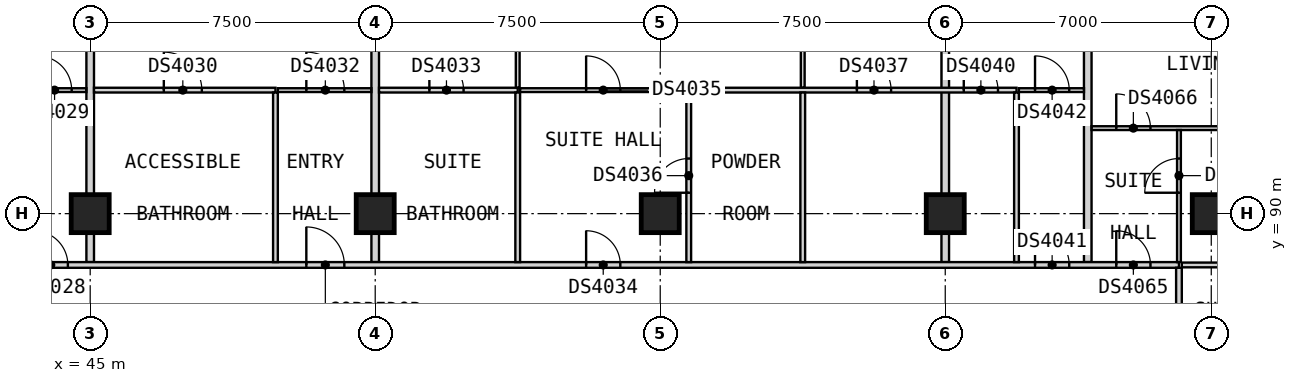
"""IFC4 building model, lengths in metres.
Left out: names, types, materials, properties, quantities, classifications, styles, units other than length and angle.
Written with IfcOpenShell. Run it as: python <this file> out.ifc"""

import sys

from ifc_helpers import new_model, si_unit, direction, frame, frame_2d, origin, origin_2d, place, context, subcontext, project, spatial, rectangle, extrude, element, fill, save


model = new_model("IFC4")
c1 = context("Model", 3, precision=1e-05, world=origin(), true_north=direction((0.0, 1.0)))
c2 = subcontext(c1, "Body", "Model", "MODEL_VIEW")
j1 = project(units=[si_unit("LENGTHUNIT", "METRE"), si_unit("PLANEANGLEUNIT", "RADIAN")], contexts=[c1])
p1 = place(None, origin())
s1 = spatial("IfcSite", under=j1, at=p1, CompositionType="ELEMENT")
p2 = place(p1, origin())
s2 = spatial("IfcBuilding", under=s1, at=p2, CompositionType="ELEMENT")
p3 = place(p2, frame((0.0, 0.0, 141.0)))
s3 = spatial("IfcBuildingStorey", under=s2, at=p3, CompositionType="ELEMENT", Elevation=141.0)
for number, where, z_axis, x_axis in (
    (1, (45.0, 90.0, 0.0), (0.0, 0.0, 1.0), (1.0, 0.0, 0.0)),
    (2, (52.5, 90.0, 0.0), (0.0, 0.0, 1.0), (1.0, 0.0, 0.0)),
    (3, (60.0, 90.0, 0.0), (0.0, 0.0, 1.0), (1.0, 0.0, 0.0)),
    (4, (67.5, 90.0, 0.0), (0.0, 0.0, 1.0), (1.0, 0.0, 0.0)),
    (5, (74.5, 90.0, 0.0), (0.0, 0.0, 1.0), (1.0, 0.0, 0.0)),
):
    element("IfcColumn", number, at=place(p3, frame(where, z_axis=z_axis, x_axis=x_axis)), inside=s3, PredefinedType="COLUMN", context=c2, shape_type="SweptSolid", body=[
        extrude(rectangle(XDim=1.0, YDim=1.0, at=origin_2d()), origin(), (0.0, 0.0, 1.0), 3.6),
    ])
for number, where, z_axis, x_axis in (
    (6, (45.0, 88.725, 0.0), (0.0, 0.0, 1.0), (0.0, 1.0, 0.0)),
    (7, (52.5, 88.725, 0.0), (0.0, 0.0, 1.0), (0.0, 1.0, 0.0)),
    (8, (67.5, 88.725, 0.0), (0.0, 0.0, 1.0), (0.0, 1.0, 0.0)),
):
    element("IfcWall", number, at=place(p3, frame(where, z_axis=z_axis, x_axis=x_axis)), inside=s3, PredefinedType="PARTITIONING", context=c2, shape_type="SweptSolid", body=[
        extrude(rectangle(XDim=12.525, YDim=0.2, at=frame_2d((6.262, 0.0))), origin(), (0.0, 0.0, 1.0), 3.35),
    ])
p4 = place(p3, frame((71.25, 88.725, 0.0), z_axis=(0.0, 0.0, 1.0), x_axis=(0.0, 1.0, 0.0)))
e9 = element("IfcWall", 9, at=p4, inside=s3, PredefinedType="PARTITIONING", context=c2, shape_type="SweptSolid", body=[
    extrude(rectangle(XDim=11.715, YDim=0.2, at=frame_2d((5.857, 0.0))), origin(), (0.0, 0.0, 1.0), 3.35),
])
p5 = place(p3, frame((33.75, 88.65, 0.0), z_axis=(0.0, 0.0, 1.0), x_axis=(1.0, 0.0, 0.0)))
e10 = element("IfcWall", 10, at=p5, inside=s3, PredefinedType="PARTITIONING", context=c2, shape_type="SweptSolid", body=[
    extrude(rectangle(XDim=39.9, YDim=0.15, at=frame_2d((19.95, 0.0))), origin(), (0.0, 0.0, 1.0), 3.35),
])
p6 = place(p5, frame((5.175, 0.0, 0.0)))
e11 = element("IfcOpeningElement", 11, at=p6, cuts=e10, PredefinedType="OPENING", context=c2, shape_type="SweptSolid", body=[
    extrude(rectangle(XDim=0.9, YDim=2.1, at=frame_2d((0.45, 1.05))), frame((0.0, 0.085, 0.0), z_axis=(0.0, -1.0, 0.0), x_axis=(1.0, 0.0, 0.0)), (0.0, 0.0, 1.0), 0.17),
])
p7 = place(p5, frame((9.762, 0.0, 0.0)))
e12 = element("IfcOpeningElement", 12, at=p7, cuts=e10, PredefinedType="OPENING", context=c2, shape_type="SweptSolid", body=[
    extrude(rectangle(XDim=0.9, YDim=2.1, at=frame_2d((0.45, 1.05))), frame((0.0, 0.085, 0.0), z_axis=(0.0, -1.0, 0.0), x_axis=(1.0, 0.0, 0.0)), (0.0, 0.0, 1.0), 0.17),
])
p8 = place(p5, frame((16.938, 0.0, 0.0)))
e13 = element("IfcOpeningElement", 13, at=p8, cuts=e10, PredefinedType="OPENING", context=c2, shape_type="SweptSolid", body=[
    extrude(rectangle(XDim=1.0, YDim=2.1, at=frame_2d((0.5, 1.05))), frame((0.0, 0.085, 0.0), z_axis=(0.0, -1.0, 0.0), x_axis=(1.0, 0.0, 0.0)), (0.0, 0.0, 1.0), 0.17),
])
p9 = place(p5, frame((24.3, 0.0, 0.0)))
e14 = element("IfcOpeningElement", 14, at=p9, cuts=e10, PredefinedType="OPENING", context=c2, shape_type="SweptSolid", body=[
    extrude(rectangle(XDim=0.9, YDim=2.1, at=frame_2d((0.45, 1.05))), frame((0.0, 0.085, 0.0), z_axis=(0.0, -1.0, 0.0), x_axis=(1.0, 0.0, 0.0)), (0.0, 0.0, 1.0), 0.17),
])
p10 = place(p5, frame((36.113, 0.0, 0.0)))
e15 = element("IfcOpeningElement", 15, at=p10, cuts=e10, PredefinedType="OPENING", context=c2, shape_type="SweptSolid", body=[
    extrude(rectangle(XDim=0.9, YDim=2.1, at=frame_2d((0.45, 1.05))), frame((0.0, 0.085, 0.0), z_axis=(0.0, -1.0, 0.0), x_axis=(1.0, 0.0, 0.0)), (0.0, 0.0, 1.0), 0.17),
])
p11 = place(p5, frame((38.25, 0.0, 0.0)))
e16 = element("IfcOpeningElement", 16, at=p11, cuts=e10, PredefinedType="OPENING", context=c2, shape_type="SweptSolid", body=[
    extrude(rectangle(XDim=0.9, YDim=2.1, at=frame_2d((0.45, 1.05))), frame((0.0, 0.085, 0.0), z_axis=(0.0, -1.0, 0.0), x_axis=(1.0, 0.0, 0.0)), (0.0, 0.0, 1.0), 0.17),
])
p12 = place(p3, frame((73.65, 50.175, 0.0), z_axis=(0.0, 0.0, 1.0), x_axis=(0.0, 1.0, 0.0)))
e17 = element("IfcWall", 17, at=p12, inside=s3, PredefinedType="PARTITIONING", context=c2, shape_type="SweptSolid", body=[
    extrude(rectangle(XDim=38.4, YDim=0.15, at=frame_2d((19.2, 0.0))), origin(), (0.0, 0.0, 1.0), 3.35),
])
p13 = place(p12, frame((7.875, 0.0, 0.0)))
e18 = element("IfcOpeningElement", 18, at=p13, cuts=e17, PredefinedType="OPENING", context=c2, shape_type="SweptSolid", body=[
    extrude(rectangle(XDim=0.9, YDim=2.1, at=frame_2d((0.45, 1.05))), frame((0.0, 0.085, 0.0), z_axis=(0.0, -1.0, 0.0), x_axis=(1.0, 0.0, 0.0)), (0.0, 0.0, 1.0), 0.17),
])
p14 = place(p12, frame((23.012, 0.0, 0.0)))
e19 = element("IfcOpeningElement", 19, at=p14, cuts=e17, PredefinedType="OPENING", context=c2, shape_type="SweptSolid", body=[
    extrude(rectangle(XDim=1.0, YDim=2.1, at=frame_2d((0.5, 1.05))), frame((0.0, 0.085, 0.0), z_axis=(0.0, -1.0, 0.0), x_axis=(1.0, 0.0, 0.0)), (0.0, 0.0, 1.0), 0.17),
])
p15 = place(p12, frame((27.188, 0.0, 0.0)))
e20 = element("IfcOpeningElement", 20, at=p15, cuts=e17, PredefinedType="OPENING", context=c2, shape_type="SweptSolid", body=[
    extrude(rectangle(XDim=0.9, YDim=2.1, at=frame_2d((0.45, 1.05))), frame((0.0, 0.085, 0.0), z_axis=(0.0, -1.0, 0.0), x_axis=(1.0, 0.0, 0.0)), (0.0, 0.0, 1.0), 0.17),
])
p16 = place(p12, frame((34.125, 0.0, 0.0)))
e21 = element("IfcOpeningElement", 21, at=p16, cuts=e17, PredefinedType="OPENING", context=c2, shape_type="SweptSolid", body=[
    extrude(rectangle(XDim=0.9, YDim=2.1, at=frame_2d((0.45, 1.05))), frame((0.0, 0.085, 0.0), z_axis=(0.0, -1.0, 0.0), x_axis=(1.0, 0.0, 0.0)), (0.0, 0.0, 1.0), 0.17),
])
p17 = place(p3, frame((71.35, 92.25, 0.0), z_axis=(0.0, 0.0, 1.0), x_axis=(1.0, 0.0, 0.0)))
e22 = element("IfcWall", 22, at=p17, inside=s3, PredefinedType="PARTITIONING", context=c2, shape_type="SweptSolid", body=[
    extrude(rectangle(XDim=7.35, YDim=0.1, at=frame_2d((3.675, 0.0))), origin(), (0.0, 0.0, 1.0), 3.35),
])
p18 = place(p17, frame((0.65, 0.0, 0.0)))
e23 = element("IfcOpeningElement", 23, at=p18, cuts=e22, PredefinedType="OPENING", context=c2, shape_type="SweptSolid", body=[
    extrude(rectangle(XDim=0.9, YDim=2.1, at=frame_2d((0.45, 1.05))), frame((0.0, 0.06, 0.0), z_axis=(0.0, -1.0, 0.0), x_axis=(1.0, 0.0, 0.0)), (0.0, 0.0, 1.0), 0.12),
])
p19 = place(p3, frame((43.188, 93.25, 0.0), z_axis=(0.0, 0.0, 1.0), x_axis=(1.0, 0.0, 0.0)))
e24 = element("IfcWall", 24, at=p19, inside=s3, PredefinedType="PARTITIONING", context=c2, shape_type="SweptSolid", body=[
    extrude(rectangle(XDim=1.712, YDim=0.1, at=frame_2d((0.856, 0.0))), origin(), (0.0, 0.0, 1.0), 3.35),
])
p20 = place(p19, frame((0.425, 0.0, 0.0)))
e25 = element("IfcOpeningElement", 25, at=p20, cuts=e24, PredefinedType="OPENING", context=c2, shape_type="SweptSolid", body=[
    extrude(rectangle(XDim=0.9, YDim=2.1, at=frame_2d((0.45, 1.05))), frame((0.0, 0.06, 0.0), z_axis=(0.0, -1.0, 0.0), x_axis=(1.0, 0.0, 0.0)), (0.0, 0.0, 1.0), 0.12),
])
p21 = place(p3, frame((49.938, 93.25, 0.0), z_axis=(0.0, 0.0, 1.0), x_axis=(1.0, 0.0, 0.0)))
e26 = element("IfcWall", 26, at=p21, inside=s3, PredefinedType="PARTITIONING", context=c2, shape_type="SweptSolid", body=[
    extrude(rectangle(XDim=2.462, YDim=0.1, at=frame_2d((1.231, 0.0))), origin(), (0.0, 0.0, 1.0), 3.35),
])
p22 = place(p21, frame((0.75, 0.0, 0.0)))
e27 = element("IfcOpeningElement", 27, at=p22, cuts=e26, PredefinedType="OPENING", context=c2, shape_type="SweptSolid", body=[
    extrude(rectangle(XDim=1.0, YDim=2.1, at=frame_2d((0.5, 1.05))), frame((0.0, 0.06, 0.0), z_axis=(0.0, -1.0, 0.0), x_axis=(1.0, 0.0, 0.0)), (0.0, 0.0, 1.0), 0.12),
])
p23 = place(p3, frame((56.312, 93.25, 0.0), z_axis=(0.0, 0.0, 1.0), x_axis=(1.0, 0.0, 0.0)))
e28 = element("IfcWall", 28, at=p23, inside=s3, PredefinedType="PARTITIONING", context=c2, shape_type="SweptSolid", body=[
    extrude(rectangle(XDim=4.375, YDim=0.1, at=frame_2d((2.188, 0.0))), origin(), (0.0, 0.0, 1.0), 3.35),
])
p24 = place(p23, frame((1.738, 0.0, 0.0)))
e29 = element("IfcOpeningElement", 29, at=p24, cuts=e28, PredefinedType="OPENING", context=c2, shape_type="SweptSolid", body=[
    extrude(rectangle(XDim=0.9, YDim=2.1, at=frame_2d((0.45, 1.05))), frame((0.0, 0.06, 0.0), z_axis=(0.0, -1.0, 0.0), x_axis=(1.0, 0.0, 0.0)), (0.0, 0.0, 1.0), 0.12),
])
p25 = place(p3, frame((69.438, 93.25, 0.0), z_axis=(0.0, 0.0, 1.0), x_axis=(1.0, 0.0, 0.0)))
e30 = element("IfcWall", 30, at=p25, inside=s3, PredefinedType="PARTITIONING", context=c2, shape_type="SweptSolid", body=[
    extrude(rectangle(XDim=1.712, YDim=0.1, at=frame_2d((0.856, 0.0))), origin(), (0.0, 0.0, 1.0), 3.35),
])
p26 = place(p25, frame((0.425, 0.0, 0.0)))
e31 = element("IfcOpeningElement", 31, at=p26, cuts=e30, PredefinedType="OPENING", context=c2, shape_type="SweptSolid", body=[
    extrude(rectangle(XDim=0.9, YDim=2.1, at=frame_2d((0.45, 1.05))), frame((0.0, 0.06, 0.0), z_axis=(0.0, -1.0, 0.0), x_axis=(1.0, 0.0, 0.0)), (0.0, 0.0, 1.0), 0.12),
])
p27 = place(p3, frame((56.25, 93.312, 0.0), z_axis=(0.0, 0.0, 1.0), x_axis=(0.0, 1.0, 0.0)))
e32 = element("IfcWall", 32, at=p27, inside=s3, PredefinedType="PARTITIONING", context=c2, shape_type="SweptSolid", body=[
    extrude(rectangle(XDim=7.127, YDim=0.1, at=frame_2d((3.564, 0.0))), origin(), (0.0, 0.0, 1.0), 3.35),
])
p28 = place(p27, frame((3.488, 0.0, 0.0)))
e33 = element("IfcOpeningElement", 33, at=p28, cuts=e32, PredefinedType="OPENING", context=c2, shape_type="SweptSolid", body=[
    extrude(rectangle(XDim=0.9, YDim=2.1, at=frame_2d((0.45, 1.05))), frame((0.0, 0.06, 0.0), z_axis=(0.0, -1.0, 0.0), x_axis=(1.0, 0.0, 0.0)), (0.0, 0.0, 1.0), 0.12),
])
p29 = place(p3, frame((63.75, 93.312, 0.0), z_axis=(0.0, 0.0, 1.0), x_axis=(0.0, 1.0, 0.0)))
e34 = element("IfcWall", 34, at=p29, inside=s3, PredefinedType="PARTITIONING", context=c2, shape_type="SweptSolid", body=[
    extrude(rectangle(XDim=7.127, YDim=0.1, at=frame_2d((3.564, 0.0))), origin(), (0.0, 0.0, 1.0), 3.35),
])
p30 = place(p29, frame((3.488, 0.0, 0.0)))
e35 = element("IfcOpeningElement", 35, at=p30, cuts=e34, PredefinedType="OPENING", context=c2, shape_type="SweptSolid", body=[
    extrude(rectangle(XDim=0.9, YDim=2.1, at=frame_2d((0.45, 1.05))), frame((0.0, 0.06, 0.0), z_axis=(0.0, -1.0, 0.0), x_axis=(1.0, 0.0, 0.0)), (0.0, 0.0, 1.0), 0.12),
])
p31 = place(p3, frame((73.65, 88.725, 0.0), z_axis=(0.0, 0.0, 1.0), x_axis=(0.0, 1.0, 0.0)))
e36 = element("IfcWall", 36, at=p31, inside=s3, PredefinedType="PARTITIONING", context=c2, shape_type="SweptSolid", body=[
    extrude(rectangle(XDim=3.475, YDim=0.1, at=frame_2d((1.737, 0.0))), origin(), (0.0, 0.0, 1.0), 3.35),
])
p32 = place(p31, frame((1.825, 0.0, 0.0)))
e37 = element("IfcOpeningElement", 37, at=p32, cuts=e36, PredefinedType="OPENING", context=c2, shape_type="SweptSolid", body=[
    extrude(rectangle(XDim=0.9, YDim=2.1, at=frame_2d((0.45, 1.05))), frame((0.0, 0.06, 0.0), z_axis=(0.0, -1.0, 0.0), x_axis=(1.0, 0.0, 0.0)), (0.0, 0.0, 1.0), 0.12),
])
p33 = place(p3, frame((73.725, 88.65, 0.0), z_axis=(0.0, 0.0, 1.0), x_axis=(1.0, 0.0, 0.0)))
e38 = element("IfcWall", 38, at=p33, inside=s3, PredefinedType="PARTITIONING", context=c2, shape_type="SweptSolid", body=[
    extrude(rectangle(XDim=5.025, YDim=0.125, at=frame_2d((2.512, 0.0))), origin(), (0.0, 0.0, 1.0), 3.35),
])
p34 = place(p3, frame((45.1, 93.25, 0.0), z_axis=(0.0, 0.0, 1.0), x_axis=(1.0, 0.0, 0.0)))
e39 = element("IfcWall", 39, at=p34, inside=s3, PredefinedType="PARTITIONING", context=c2, shape_type="SweptSolid", body=[
    extrude(rectangle(XDim=4.775, YDim=0.125, at=frame_2d((2.387, 0.0))), origin(), (0.0, 0.0, 1.0), 3.35),
])
p35 = place(p34, frame((1.837, 0.0, 0.0)))
e40 = element("IfcOpeningElement", 40, at=p35, cuts=e39, PredefinedType="OPENING", context=c2, shape_type="SweptSolid", body=[
    extrude(rectangle(XDim=1.0, YDim=2.1, at=frame_2d((0.5, 1.05))), frame((0.0, 0.073, 0.0), z_axis=(0.0, -1.0, 0.0), x_axis=(1.0, 0.0, 0.0)), (0.0, 0.0, 1.0), 0.145),
])
p36 = place(p3, frame((52.6, 93.25, 0.0), z_axis=(0.0, 0.0, 1.0), x_axis=(1.0, 0.0, 0.0)))
e41 = element("IfcWall", 41, at=p36, inside=s3, PredefinedType="PARTITIONING", context=c2, shape_type="SweptSolid", body=[
    extrude(rectangle(XDim=3.65, YDim=0.125, at=frame_2d((1.825, 0.0))), origin(), (0.0, 0.0, 1.0), 3.35),
])
p37 = place(p36, frame((1.325, 0.0, 0.0)))
e42 = element("IfcOpeningElement", 42, at=p37, cuts=e41, PredefinedType="OPENING", context=c2, shape_type="SweptSolid", body=[
    extrude(rectangle(XDim=0.9, YDim=2.1, at=frame_2d((0.45, 1.05))), frame((0.0, 0.073, 0.0), z_axis=(0.0, -1.0, 0.0), x_axis=(1.0, 0.0, 0.0)), (0.0, 0.0, 1.0), 0.145),
])
p38 = place(p3, frame((60.75, 93.25, 0.0), z_axis=(0.0, 0.0, 1.0), x_axis=(1.0, 0.0, 0.0)))
e43 = element("IfcWall", 43, at=p38, inside=s3, PredefinedType="PARTITIONING", context=c2, shape_type="SweptSolid", body=[
    extrude(rectangle(XDim=8.625, YDim=0.125, at=frame_2d((4.312, 0.0))), origin(), (0.0, 0.0, 1.0), 3.35),
])
p39 = place(p38, frame((4.425, 0.0, 0.0)))
e44 = element("IfcOpeningElement", 44, at=p39, cuts=e43, PredefinedType="OPENING", context=c2, shape_type="SweptSolid", body=[
    extrude(rectangle(XDim=0.9, YDim=2.1, at=frame_2d((0.45, 1.05))), frame((0.0, 0.073, 0.0), z_axis=(0.0, -1.0, 0.0), x_axis=(1.0, 0.0, 0.0)), (0.0, 0.0, 1.0), 0.145),
])
p40 = place(p38, frame((7.238, 0.0, 0.0)))
e45 = element("IfcOpeningElement", 45, at=p40, cuts=e43, PredefinedType="OPENING", context=c2, shape_type="SweptSolid", body=[
    extrude(rectangle(XDim=0.9, YDim=2.1, at=frame_2d((0.45, 1.05))), frame((0.0, 0.073, 0.0), z_axis=(0.0, -1.0, 0.0), x_axis=(1.0, 0.0, 0.0)), (0.0, 0.0, 1.0), 0.145),
])
for number, where, z_axis, x_axis in (
    (46, (49.875, 88.725, 0.0), (0.0, 0.0, 1.0), (0.0, 1.0, 0.0)),
    (47, (56.25, 88.725, 0.0), (0.0, 0.0, 1.0), (0.0, 1.0, 0.0)),
):
    element("IfcWall", number, at=place(p3, frame(where, z_axis=z_axis, x_axis=x_axis)), inside=s3, PredefinedType="PARTITIONING", context=c2, shape_type="SweptSolid", body=[
        extrude(rectangle(XDim=4.462, YDim=0.125, at=frame_2d((2.231, 0.0))), origin(), (0.0, 0.0, 1.0), 3.35),
    ])
p41 = place(p3, frame((60.75, 88.725, 0.0), z_axis=(0.0, 0.0, 1.0), x_axis=(0.0, 1.0, 0.0)))
e48 = element("IfcWall", 48, at=p41, inside=s3, PredefinedType="PARTITIONING", context=c2, shape_type="SweptSolid", body=[
    extrude(rectangle(XDim=4.462, YDim=0.125, at=frame_2d((2.231, 0.0))), origin(), (0.0, 0.0, 1.0), 3.35),
])
p42 = place(p41, frame((1.825, 0.0, 0.0)))
e49 = element("IfcOpeningElement", 49, at=p42, cuts=e48, PredefinedType="OPENING", context=c2, shape_type="SweptSolid", body=[
    extrude(rectangle(XDim=0.9, YDim=2.1, at=frame_2d((0.45, 1.05))), frame((0.0, 0.073, 0.0), z_axis=(0.0, -1.0, 0.0), x_axis=(1.0, 0.0, 0.0)), (0.0, 0.0, 1.0), 0.145),
])
for number, where, z_axis, x_axis in (
    (50, (63.75, 88.725, 0.0), (0.0, 0.0, 1.0), (0.0, 1.0, 0.0)),
    (51, (69.375, 88.725, 0.0), (0.0, 0.0, 1.0), (0.0, 1.0, 0.0)),
):
    element("IfcWall", number, at=place(p3, frame(where, z_axis=z_axis, x_axis=x_axis)), inside=s3, PredefinedType="PARTITIONING", context=c2, shape_type="SweptSolid", body=[
        extrude(rectangle(XDim=4.462, YDim=0.125, at=frame_2d((2.231, 0.0))), origin(), (0.0, 0.0, 1.0), 3.35),
    ])
p43 = place(p7, origin())
e52 = element("IfcDoor", 52, at=p43, inside=s3, OperationType="SINGLE_SWING_LEFT", PredefinedType="DOOR", context=c2, shape_type="SweptSolid", body=[
    extrude(rectangle(XDim=0.9, YDim=2.1, at=frame_2d((0.45, 1.05))), frame((0.0, 0.025, 0.0), z_axis=(0.0, -1.0, 0.0), x_axis=(1.0, 0.0, 0.0)), (0.0, 0.0, 1.0), 0.05),
])
fill(e12, e52)
p44 = place(p20, origin())
e53 = element("IfcDoor", 53, at=p44, inside=s3, OperationType="SINGLE_SWING_RIGHT", PredefinedType="DOOR", context=c2, shape_type="SweptSolid", body=[
    extrude(rectangle(XDim=0.9, YDim=2.1, at=frame_2d((0.45, 1.05))), frame((0.0, 0.025, 0.0), z_axis=(0.0, -1.0, 0.0), x_axis=(1.0, 0.0, 0.0)), (0.0, 0.0, 1.0), 0.05),
])
fill(e25, e53)
p45 = place(p35, origin())
e54 = element("IfcDoor", 54, at=p45, inside=s3, OperationType="SINGLE_SWING_RIGHT", PredefinedType="DOOR", context=c2, shape_type="SweptSolid", body=[
    extrude(rectangle(XDim=1.0, YDim=2.1, at=frame_2d((0.5, 1.05))), frame((0.0, 0.025, 0.0), z_axis=(0.0, -1.0, 0.0), x_axis=(1.0, 0.0, 0.0)), (0.0, 0.0, 1.0), 0.05),
])
fill(e40, e54)
p46 = place(p8, origin())
e55 = element("IfcDoor", 55, at=p46, inside=s3, OperationType="SINGLE_SWING_LEFT", PredefinedType="DOOR", context=c2, shape_type="SweptSolid", body=[
    extrude(rectangle(XDim=1.0, YDim=2.1, at=frame_2d((0.5, 1.05))), frame((0.0, 0.025, 0.0), z_axis=(0.0, -1.0, 0.0), x_axis=(1.0, 0.0, 0.0)), (0.0, 0.0, 1.0), 0.05),
])
fill(e13, e55)
p47 = place(p22, origin())
e56 = element("IfcDoor", 56, at=p47, inside=s3, OperationType="SINGLE_SWING_RIGHT", PredefinedType="DOOR", context=c2, shape_type="SweptSolid", body=[
    extrude(rectangle(XDim=1.0, YDim=2.1, at=frame_2d((0.5, 1.05))), frame((0.0, 0.025, 0.0), z_axis=(0.0, -1.0, 0.0), x_axis=(1.0, 0.0, 0.0)), (0.0, 0.0, 1.0), 0.05),
])
fill(e27, e56)
p48 = place(p37, origin())
e57 = element("IfcDoor", 57, at=p48, inside=s3, OperationType="SINGLE_SWING_RIGHT", PredefinedType="DOOR", context=c2, shape_type="SweptSolid", body=[
    extrude(rectangle(XDim=0.9, YDim=2.1, at=frame_2d((0.45, 1.05))), frame((0.0, 0.025, 0.0), z_axis=(0.0, -1.0, 0.0), x_axis=(1.0, 0.0, 0.0)), (0.0, 0.0, 1.0), 0.05),
])
fill(e42, e57)
p49 = place(p9, origin())
e58 = element("IfcDoor", 58, at=p49, inside=s3, OperationType="SINGLE_SWING_LEFT", PredefinedType="DOOR", context=c2, shape_type="SweptSolid", body=[
    extrude(rectangle(XDim=0.9, YDim=2.1, at=frame_2d((0.45, 1.05))), frame((0.0, 0.025, 0.0), z_axis=(0.0, -1.0, 0.0), x_axis=(1.0, 0.0, 0.0)), (0.0, 0.0, 1.0), 0.05),
])
fill(e14, e58)
p50 = place(p24, origin())
e59 = element("IfcDoor", 59, at=p50, inside=s3, OperationType="SINGLE_SWING_RIGHT", PredefinedType="DOOR", context=c2, shape_type="SweptSolid", body=[
    extrude(rectangle(XDim=0.9, YDim=2.1, at=frame_2d((0.45, 1.05))), frame((0.0, 0.025, 0.0), z_axis=(0.0, -1.0, 0.0), x_axis=(1.0, 0.0, 0.0)), (0.0, 0.0, 1.0), 0.05),
])
fill(e29, e59)
p51 = place(p42, origin())
e60 = element("IfcDoor", 60, at=p51, inside=s3, OperationType="SINGLE_SWING_LEFT", PredefinedType="DOOR", context=c2, shape_type="SweptSolid", body=[
    extrude(rectangle(XDim=0.9, YDim=2.1, at=frame_2d((0.45, 1.05))), frame((0.0, 0.025, 0.0), z_axis=(0.0, -1.0, 0.0), x_axis=(1.0, 0.0, 0.0)), (0.0, 0.0, 1.0), 0.05),
])
fill(e49, e60)
p52 = place(p39, origin())
e61 = element("IfcDoor", 61, at=p52, inside=s3, OperationType="SINGLE_SWING_RIGHT", PredefinedType="DOOR", context=c2, shape_type="SweptSolid", body=[
    extrude(rectangle(XDim=0.9, YDim=2.1, at=frame_2d((0.45, 1.05))), frame((0.0, 0.025, 0.0), z_axis=(0.0, -1.0, 0.0), x_axis=(1.0, 0.0, 0.0)), (0.0, 0.0, 1.0), 0.05),
])
fill(e44, e61)
p53 = place(p40, origin())
e62 = element("IfcDoor", 62, at=p53, inside=s3, OperationType="SINGLE_SWING_RIGHT", PredefinedType="DOOR", context=c2, shape_type="SweptSolid", body=[
    extrude(rectangle(XDim=0.9, YDim=2.1, at=frame_2d((0.45, 1.05))), frame((0.0, 0.025, 0.0), z_axis=(0.0, -1.0, 0.0), x_axis=(1.0, 0.0, 0.0)), (0.0, 0.0, 1.0), 0.05),
])
fill(e45, e62)
p54 = place(p10, origin())
e63 = element("IfcDoor", 63, at=p54, inside=s3, OperationType="SINGLE_SWING_LEFT", PredefinedType="DOOR", context=c2, shape_type="SweptSolid", body=[
    extrude(rectangle(XDim=0.9, YDim=2.1, at=frame_2d((0.45, 1.05))), frame((0.0, 0.025, 0.0), z_axis=(0.0, -1.0, 0.0), x_axis=(1.0, 0.0, 0.0)), (0.0, 0.0, 1.0), 0.05),
])
fill(e15, e63)
p55 = place(p26, origin())
e64 = element("IfcDoor", 64, at=p55, inside=s3, OperationType="SINGLE_SWING_RIGHT", PredefinedType="DOOR", context=c2, shape_type="SweptSolid", body=[
    extrude(rectangle(XDim=0.9, YDim=2.1, at=frame_2d((0.45, 1.05))), frame((0.0, 0.025, 0.0), z_axis=(0.0, -1.0, 0.0), x_axis=(1.0, 0.0, 0.0)), (0.0, 0.0, 1.0), 0.05),
])
fill(e31, e64)
p56 = place(p11, origin())
e65 = element("IfcDoor", 65, at=p56, inside=s3, OperationType="SINGLE_SWING_RIGHT", PredefinedType="DOOR", context=c2, shape_type="SweptSolid", body=[
    extrude(rectangle(XDim=0.9, YDim=2.1, at=frame_2d((0.45, 1.05))), frame((0.0, 0.025, 0.0), z_axis=(0.0, -1.0, 0.0), x_axis=(1.0, 0.0, 0.0)), (0.0, 0.0, 1.0), 0.05),
])
fill(e16, e65)
p57 = place(p18, origin())
e66 = element("IfcDoor", 66, at=p57, inside=s3, OperationType="SINGLE_SWING_LEFT", PredefinedType="DOOR", context=c2, shape_type="SweptSolid", body=[
    extrude(rectangle(XDim=0.9, YDim=2.1, at=frame_2d((0.45, 1.05))), frame((0.0, 0.025, 0.0), z_axis=(0.0, -1.0, 0.0), x_axis=(1.0, 0.0, 0.0)), (0.0, 0.0, 1.0), 0.05),
])
fill(e23, e66)
p58 = place(p32, origin())
e67 = element("IfcDoor", 67, at=p58, inside=s3, OperationType="SINGLE_SWING_RIGHT", PredefinedType="DOOR", context=c2, shape_type="SweptSolid", body=[
    extrude(rectangle(XDim=0.9, YDim=2.1, at=frame_2d((0.45, 1.05))), frame((0.0, 0.025, 0.0), z_axis=(0.0, -1.0, 0.0), x_axis=(1.0, 0.0, 0.0)), (0.0, 0.0, 1.0), 0.05),
])
fill(e37, e67)
save(model, sys.argv[1])
